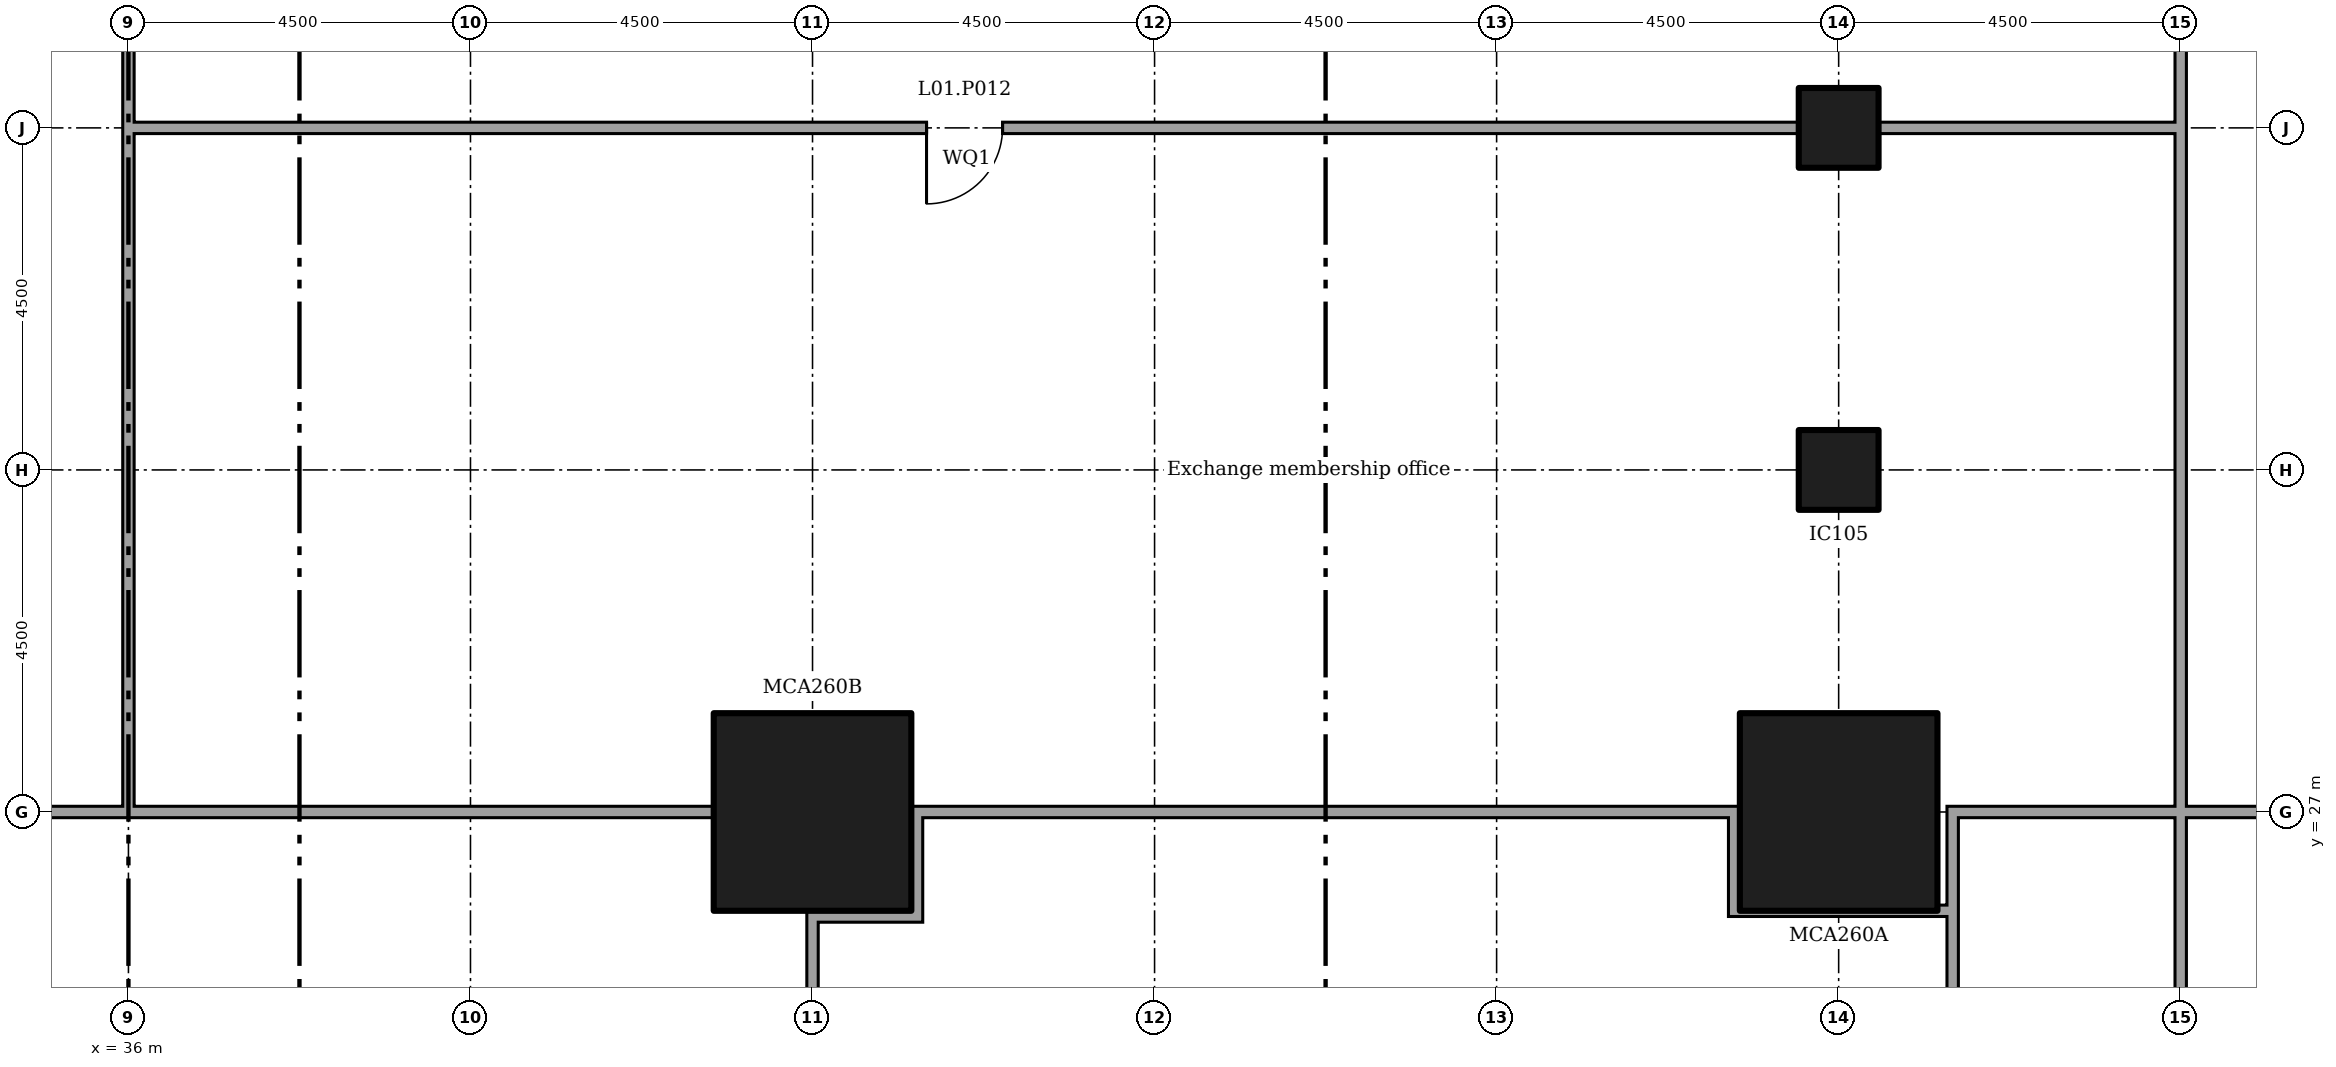
"""IFC4 building model, lengths in metres.
Left out: names, types, materials, properties, quantities, classifications, styles, units other than length and angle.
Written with IfcOpenShell. Run it as: python <this file> out.ifc"""

import sys

from ifc_helpers import new_model, si_unit, direction, frame, frame_2d, origin, origin_2d, place, context, subcontext, project, spatial, rectangle, extrude, element, fill, save


model = new_model("IFC4")
c1 = context("Model", 3, precision=1e-05, world=origin(), true_north=direction((0.0, 1.0)))
c2 = subcontext(c1, "Body", "Model", "MODEL_VIEW")
j1 = project(units=[si_unit("LENGTHUNIT", "METRE"), si_unit("PLANEANGLEUNIT", "RADIAN")], contexts=[c1])
p1 = place(None, origin())
s1 = spatial("IfcSite", under=j1, at=p1, CompositionType="ELEMENT")
p2 = place(p1, origin())
s2 = spatial("IfcBuilding", under=s1, at=p2, CompositionType="ELEMENT")
p3 = place(p2, frame((0.0, 0.0, 6.0)))
s3 = spatial("IfcBuildingStorey", under=s2, at=p3, CompositionType="ELEMENT", Elevation=6.0)
for number, where in (
    (1, (45.0, 27.0, 0.0)),
    (2, (58.5, 27.0, 0.0)),
):
    element("IfcColumn", number, at=place(p3, frame(where)), inside=s3, PredefinedType="COLUMN", context=c2, shape_type="SweptSolid", body=[
        extrude(rectangle(XDim=2.6, YDim=2.6, at=origin_2d()), origin(), (0.0, 0.0, 1.0), 5.5),
    ])
for number, where in (
    (3, (58.5, 31.5, 0.0)),
    (4, (58.5, 36.0, 0.0)),
):
    element("IfcColumn", number, at=place(p3, frame(where)), inside=s3, PredefinedType="COLUMN", context=c2, shape_type="SweptSolid", body=[
        extrude(rectangle(XDim=1.05, YDim=1.05, at=origin_2d()), origin(), (0.0, 0.0, 1.0), 5.5),
    ])
p4 = place(p3, frame((45.0, 18.075, 0.0), z_axis=(0.0, 0.0, 1.0), x_axis=(0.0, 1.0, 0.0)))
e5 = element("IfcWall", 5, at=p4, inside=s3, PredefinedType="PARTITIONING", context=c2, shape_type="SweptSolid", body=[
    extrude(rectangle(XDim=7.625, YDim=0.15, at=frame_2d((3.812, 0.0))), origin(), (0.0, 0.0, 1.0), 5.05),
])
p5 = place(p3, frame((32.795, 27.0, 0.0)))
e6 = element("IfcWall", 6, at=p5, inside=s3, PredefinedType="PARTITIONING", context=c2, shape_type="SweptSolid", body=[
    extrude(rectangle(XDim=3.28, YDim=0.15, at=frame_2d((1.64, 0.0))), origin(), (0.0, 0.0, 1.0), 5.05),
])
p6 = place(p3, frame((36.0, 27.0, 0.0)))
e7 = element("IfcWall", 7, at=p6, inside=s3, PredefinedType="PARTITIONING", context=c2, shape_type="SweptSolid", body=[
    extrude(rectangle(XDim=7.705, YDim=0.15, at=frame_2d((3.853, 0.0))), origin(), (0.0, 0.0, 1.0), 5.05),
])
p7 = place(p3, frame((60.0, 18.075, 0.0), z_axis=(0.0, 0.0, 1.0), x_axis=(0.0, 1.0, 0.0)))
e8 = element("IfcWall", 8, at=p7, inside=s3, PredefinedType="PARTITIONING", context=c2, shape_type="SweptSolid", body=[
    extrude(rectangle(XDim=7.7, YDim=0.15, at=frame_2d((3.85, 0.0))), origin(), (0.0, 0.0, 1.0), 5.05),
])
p8 = place(p3, frame((46.375, 25.55, 0.0), z_axis=(0.0, 0.0, 1.0), x_axis=(0.0, 1.0, 0.0)))
e9 = element("IfcWall", 9, at=p8, inside=s3, PredefinedType="PARTITIONING", context=c2, shape_type="SweptSolid", body=[
    extrude(rectangle(XDim=1.525, YDim=0.15, at=frame_2d((0.762, 0.0))), origin(), (0.0, 0.0, 1.0), 5.05),
])
p9 = place(p3, frame((57.125, 25.625, 0.0), z_axis=(0.0, 0.0, 1.0), x_axis=(0.0, 1.0, 0.0)))
e10 = element("IfcWall", 10, at=p9, inside=s3, PredefinedType="PARTITIONING", context=c2, shape_type="SweptSolid", body=[
    extrude(rectangle(XDim=1.45, YDim=0.15, at=frame_2d((0.725, 0.0))), origin(), (0.0, 0.0, 1.0), 5.05),
])
p10 = place(p3, frame((45.075, 25.625, 0.0)))
e11 = element("IfcWall", 11, at=p10, inside=s3, PredefinedType="PARTITIONING", context=c2, shape_type="SweptSolid", body=[
    extrude(rectangle(XDim=1.225, YDim=0.15, at=frame_2d((0.613, 0.0))), origin(), (0.0, 0.0, 1.0), 5.05),
])
p11 = place(p3, frame((57.2, 25.7, 0.0)))
e12 = element("IfcWall", 12, at=p11, inside=s3, PredefinedType="PARTITIONING", context=c2, shape_type="SweptSolid", body=[
    extrude(rectangle(XDim=2.725, YDim=0.15, at=frame_2d((1.363, 0.0))), origin(), (0.0, 0.0, 1.0), 5.05),
])
p12 = place(p3, frame((46.45, 27.0, 0.0)))
e13 = element("IfcWall", 13, at=p12, inside=s3, PredefinedType="PARTITIONING", context=c2, shape_type="SweptSolid", body=[
    extrude(rectangle(XDim=10.6, YDim=0.15, at=frame_2d((5.3, 0.0))), origin(), (0.0, 0.0, 1.0), 5.05),
])
p13 = place(p3, frame((63.0, 23.05, 0.0), z_axis=(0.0, 0.0, 1.0), x_axis=(0.0, 1.0, 0.0)))
e14 = element("IfcWall", 14, at=p13, inside=s3, PredefinedType="PARTITIONING", context=c2, shape_type="SweptSolid", body=[
    extrude(rectangle(XDim=4.025, YDim=0.15, at=frame_2d((2.012, 0.0))), origin(), (0.0, 0.0, 1.0), 5.05),
])
p14 = place(p3, frame((60.0, 25.7, 0.0), z_axis=(0.0, 0.0, 1.0), x_axis=(0.0, 1.0, 0.0)))
e15 = element("IfcWall", 15, at=p14, inside=s3, PredefinedType="PARTITIONING", context=c2, shape_type="SweptSolid", body=[
    extrude(rectangle(XDim=1.375, YDim=0.15, at=frame_2d((0.688, 0.0))), origin(), (0.0, 0.0, 1.0), 5.05),
])
p15 = place(p3, frame((60.075, 27.0, 0.0)))
e16 = element("IfcWall", 16, at=p15, inside=s3, PredefinedType="PARTITIONING", context=c2, shape_type="SweptSolid", body=[
    extrude(rectangle(XDim=3.0, YDim=0.15, at=frame_2d((1.5, 0.0))), origin(), (0.0, 0.0, 1.0), 5.05),
])
p16 = place(p3, frame((63.075, 27.0, 0.0)))
e17 = element("IfcWall", 17, at=p16, inside=s3, PredefinedType="PARTITIONING", context=c2, shape_type="SweptSolid", body=[
    extrude(rectangle(XDim=3.13, YDim=0.15, at=frame_2d((1.565, 0.0))), origin(), (0.0, 0.0, 1.0), 5.05),
])
p17 = place(p3, frame((63.0, 27.075, 0.0), z_axis=(0.0, 0.0, 1.0), x_axis=(0.0, 1.0, 0.0)))
e18 = element("IfcWall", 18, at=p17, inside=s3, PredefinedType="PARTITIONING", context=c2, shape_type="SweptSolid", body=[
    extrude(rectangle(XDim=9.0, YDim=0.15, at=frame_2d((4.5, 0.0))), origin(), (0.0, 0.0, 1.0), 5.05),
])
p18 = place(p3, frame((63.0, 36.0, 0.0), z_axis=(0.0, 0.0, 1.0), x_axis=(0.0, 1.0, 0.0)))
e19 = element("IfcWall", 19, at=p18, inside=s3, PredefinedType="PARTITIONING", context=c2, shape_type="SweptSolid", body=[
    extrude(rectangle(XDim=21.98, YDim=0.15, at=frame_2d((10.99, 0.0))), origin(), (0.0, 0.0, 1.0), 5.05),
])
p19 = place(p18, frame((10.1, 0.0, 0.0)))
e20 = element("IfcOpeningElement", 20, at=p19, cuts=e19, PredefinedType="OPENING", context=c2, shape_type="SweptSolid", body=[
    extrude(rectangle(XDim=1.8, YDim=2.1, at=frame_2d((0.9, 1.05))), frame((0.0, 0.085, 0.0), z_axis=(0.0, -1.0, 0.0), x_axis=(1.0, 0.0, 0.0)), (0.0, 0.0, 1.0), 0.17),
])
p20 = place(p3, frame((36.0, 27.075, 0.0), z_axis=(0.0, 0.0, 1.0), x_axis=(0.0, 1.0, 0.0)))
e21 = element("IfcWall", 21, at=p20, inside=s3, PredefinedType="PARTITIONING", context=c2, shape_type="SweptSolid", body=[
    extrude(rectangle(XDim=9.0, YDim=0.15, at=frame_2d((4.5, 0.0))), origin(), (0.0, 0.0, 1.0), 5.05),
])
p21 = place(p3, frame((36.0, 36.0, 0.0), z_axis=(0.0, 0.0, 1.0), x_axis=(0.0, 1.0, 0.0)))
e22 = element("IfcWall", 22, at=p21, inside=s3, PredefinedType="PARTITIONING", context=c2, shape_type="SweptSolid", body=[
    extrude(rectangle(XDim=3.98, YDim=0.15, at=frame_2d((1.99, 0.0))), origin(), (0.0, 0.0, 1.0), 5.05),
])
p22 = place(p3, frame((36.075, 36.0, 0.0)))
e23 = element("IfcWall", 23, at=p22, inside=s3, PredefinedType="PARTITIONING", context=c2, shape_type="SweptSolid", body=[
    extrude(rectangle(XDim=21.905, YDim=0.15, at=frame_2d((10.953, 0.0))), origin(), (0.0, 0.0, 1.0), 5.05),
])
p23 = place(p22, frame((10.425, 0.0, 0.0)))
e24 = element("IfcOpeningElement", 24, at=p23, cuts=e23, PredefinedType="OPENING", context=c2, shape_type="SweptSolid", body=[
    extrude(rectangle(XDim=1.0, YDim=2.1, at=frame_2d((0.5, 1.05))), frame((0.0, 0.085, 0.0), z_axis=(0.0, -1.0, 0.0), x_axis=(1.0, 0.0, 0.0)), (0.0, 0.0, 1.0), 0.17),
])
p24 = place(p3, frame((59.02, 36.0, 0.0)))
e25 = element("IfcWall", 25, at=p24, inside=s3, PredefinedType="PARTITIONING", context=c2, shape_type="SweptSolid", body=[
    extrude(rectangle(XDim=3.905, YDim=0.15, at=frame_2d((1.953, 0.0))), origin(), (0.0, 0.0, 1.0), 5.05),
])
p25 = place(p23, frame((1.0, 0.0, 0.0), x_axis=(-1.0, 0.0, 0.0)))
e26 = element("IfcDoor", 26, at=p25, inside=s3, OperationType="SINGLE_SWING_LEFT", PredefinedType="DOOR", context=c2, shape_type="SweptSolid", body=[
    extrude(rectangle(XDim=1.0, YDim=2.1, at=frame_2d((0.5, 1.05))), frame((0.0, 0.025, 0.0), z_axis=(0.0, -1.0, 0.0), x_axis=(1.0, 0.0, 0.0)), (0.0, 0.0, 1.0), 0.05),
])
fill(e24, e26)
save(model, sys.argv[1])
